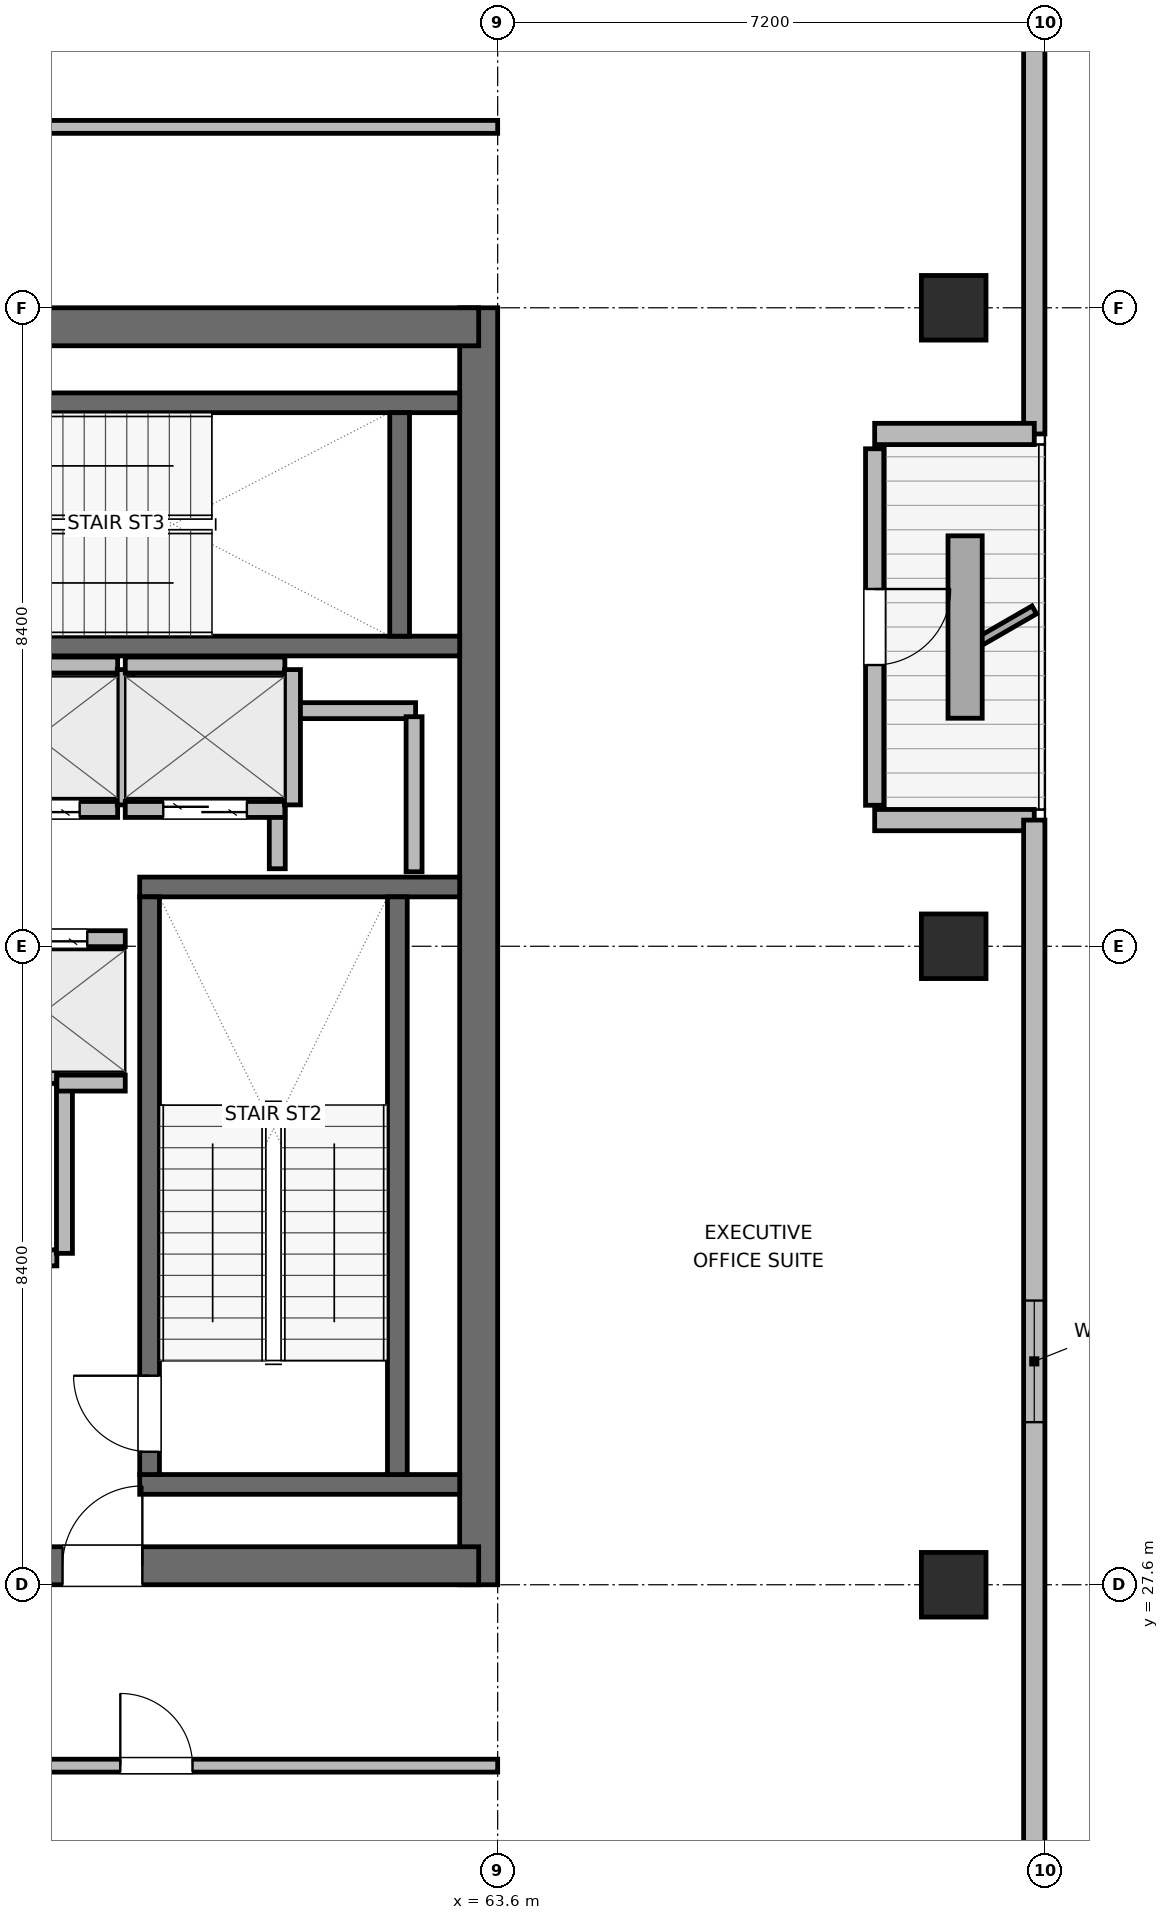
"""IFC4 building model, lengths in metres.
Left out: names, types, materials, properties, quantities, classifications, styles, units other than length and angle.
Written with IfcOpenShell. Run it as: python <this file> out.ifc"""

import sys

from ifc_helpers import new_model, si_unit, direction, frame, frame_2d, origin, origin_2d, place, context, subcontext, project, spatial, rectangle, extrude, element, fill, save


model = new_model("IFC4")
c1 = context("Model", 3, precision=1e-05, world=origin(), true_north=direction((0.0, 1.0)))
c2 = subcontext(c1, "Body", "Model", "MODEL_VIEW")
j1 = project(units=[si_unit("LENGTHUNIT", "METRE"), si_unit("PLANEANGLEUNIT", "RADIAN")], contexts=[c1])
p1 = place(None, origin())
s1 = spatial("IfcSite", under=j1, at=p1, CompositionType="ELEMENT")
p2 = place(p1, origin())
s2 = spatial("IfcBuilding", under=s1, at=p2, CompositionType="ELEMENT")
p3 = place(p2, frame((0.0, 0.0, 337.5)))
s3 = spatial("IfcBuildingStorey", under=s2, at=p3, CompositionType="ELEMENT", Elevation=337.5)
p4 = place(p3, frame((63.35, 27.6, 0.0), z_axis=(0.0, 0.0, 1.0), x_axis=(0.0, 1.0, 0.0)))
e1 = element("IfcWall", 1, at=p4, inside=s3, PredefinedType="SHEAR", context=c2, shape_type="SweptSolid", body=[
    extrude(rectangle(XDim=16.8, YDim=0.5, at=frame_2d((8.4, 0.0))), origin(), (0.0, 0.0, 1.0), 4.5),
])
p5 = place(p3, frame((53.85, 27.85, 0.0), z_axis=(0.0, 0.0, 1.0), x_axis=(1.0, 0.0, 0.0)))
e2 = element("IfcWall", 2, at=p5, inside=s3, PredefinedType="SHEAR", context=c2, shape_type="SweptSolid", body=[
    extrude(rectangle(XDim=9.5, YDim=0.5, at=frame_2d((4.75, 0.0))), origin(), (0.0, 0.0, 1.0), 4.5),
])
p6 = place(p5, frame((4.025, 0.0, 0.0)))
e3 = element("IfcOpeningElement", 3, at=p6, cuts=e2, PredefinedType="OPENING", context=c2, shape_type="SweptSolid", body=[
    extrude(rectangle(XDim=1.05, YDim=2.04, at=frame_2d((0.525, 1.02))), frame((0.0, 0.26, 0.0), z_axis=(0.0, -1.0, 0.0), x_axis=(1.0, 0.0, 0.0)), (0.0, 0.0, 1.0), 0.52),
])
p7 = place(p3, frame((53.85, 44.15, 0.0), z_axis=(0.0, 0.0, 1.0), x_axis=(1.0, 0.0, 0.0)))
e4 = element("IfcWall", 4, at=p7, inside=s3, PredefinedType="SHEAR", context=c2, shape_type="SweptSolid", body=[
    extrude(rectangle(XDim=9.5, YDim=0.5, at=frame_2d((4.75, 0.0))), origin(), (0.0, 0.0, 1.0), 4.5),
])
for number, where, z_axis, x_axis in (
    (5, (58.89, 28.92, 0.0), (0.0, 0.0, 1.0), (1.0, 0.0, 0.0)),
    (6, (58.89, 36.78, 0.0), (0.0, 0.0, 1.0), (1.0, 0.0, 0.0)),
):
    element("IfcWall", number, at=place(p3, frame(where, z_axis=z_axis, x_axis=x_axis)), inside=s3, PredefinedType="SHEAR", context=c2, shape_type="SweptSolid", body=[
        extrude(rectangle(XDim=4.21, YDim=0.26, at=frame_2d((2.105, 0.0))), origin(), (0.0, 0.0, 1.0), 4.5),
    ])
p8 = place(p3, frame((59.02, 29.05, 0.0), z_axis=(0.0, 0.0, 1.0), x_axis=(0.0, 1.0, 0.0)))
e7 = element("IfcWall", 7, at=p8, inside=s3, PredefinedType="SHEAR", context=c2, shape_type="SweptSolid", body=[
    extrude(rectangle(XDim=7.6, YDim=0.26, at=frame_2d((3.8, 0.0))), origin(), (0.0, 0.0, 1.0), 4.5),
])
p9 = place(p8, frame((0.3, 0.0, 0.0)))
e8 = element("IfcOpeningElement", 8, at=p9, cuts=e7, PredefinedType="OPENING", context=c2, shape_type="SweptSolid", body=[
    extrude(rectangle(XDim=1.0, YDim=2.04, at=frame_2d((0.5, 1.02))), frame((0.0, 0.14, 0.0), z_axis=(0.0, -1.0, 0.0), x_axis=(1.0, 0.0, 0.0)), (0.0, 0.0, 1.0), 0.28),
])
p10 = place(p3, frame((62.28, 29.05, 0.0), z_axis=(0.0, 0.0, 1.0), x_axis=(0.0, 1.0, 0.0)))
e9 = element("IfcWall", 9, at=p10, inside=s3, PredefinedType="SHEAR", context=c2, shape_type="SweptSolid", body=[
    extrude(rectangle(XDim=7.6, YDim=0.26, at=frame_2d((3.8, 0.0))), origin(), (0.0, 0.0, 1.0), 4.5),
])
p11 = place(p3, frame((54.1, 39.95, 0.0), z_axis=(0.0, 0.0, 1.0), x_axis=(1.0, 0.0, 0.0)))
e10 = element("IfcWall", 10, at=p11, inside=s3, PredefinedType="SHEAR", context=c2, shape_type="SweptSolid", body=[
    extrude(rectangle(XDim=9.0, YDim=0.26, at=frame_2d((4.5, 0.0))), origin(), (0.0, 0.0, 1.0), 4.5),
])
p12 = place(p11, frame((1.1, 0.0, 0.0)))
e11 = element("IfcOpeningElement", 11, at=p12, cuts=e10, PredefinedType="OPENING", context=c2, shape_type="SweptSolid", body=[
    extrude(rectangle(XDim=1.0, YDim=2.04, at=frame_2d((0.5, 1.02))), frame((0.0, 0.14, 0.0), z_axis=(0.0, -1.0, 0.0), x_axis=(1.0, 0.0, 0.0)), (0.0, 0.0, 1.0), 0.28),
])
p13 = place(p3, frame((54.1, 43.15, 0.0), z_axis=(0.0, 0.0, 1.0), x_axis=(1.0, 0.0, 0.0)))
e12 = element("IfcWall", 12, at=p13, inside=s3, PredefinedType="SHEAR", context=c2, shape_type="SweptSolid", body=[
    extrude(rectangle(XDim=9.0, YDim=0.26, at=frame_2d((4.5, 0.0))), origin(), (0.0, 0.0, 1.0), 4.5),
])
p14 = place(p3, frame((62.31, 40.08, 0.0), z_axis=(0.0, 0.0, 1.0), x_axis=(0.0, 1.0, 0.0)))
e13 = element("IfcWall", 13, at=p14, inside=s3, PredefinedType="SHEAR", context=c2, shape_type="SweptSolid", body=[
    extrude(rectangle(XDim=2.94, YDim=0.26, at=frame_2d((1.47, 0.0))), origin(), (0.0, 0.0, 1.0), 4.5),
])
for number, where, z_axis, x_axis in (
    (14, (69.6, 27.6, 0.0), (0.0, 0.0, 1.0), (1.0, 0.0, 0.0)),
    (15, (69.6, 36.0, 0.0), (0.0, 0.0, 1.0), (1.0, 0.0, 0.0)),
    (16, (69.6, 44.4, 0.0), (0.0, 0.0, 1.0), (1.0, 0.0, 0.0)),
):
    element("IfcColumn", number, at=place(p3, frame(where, z_axis=z_axis, x_axis=x_axis)), inside=s3, PredefinedType="COLUMN", context=c2, shape_type="SweptSolid", body=[
        extrude(rectangle(XDim=0.85, YDim=0.85, at=origin_2d()), origin(), (0.0, 0.0, 1.0), 4.5),
    ])
p15 = place(p3, frame((70.66, 48.582, 0.0), z_axis=(0.0, 0.0, 1.0), x_axis=(0.0, -1.0, 0.0)))
e17 = element("IfcWall", 17, at=p15, inside=s3, PredefinedType="SOLIDWALL", context=c2, shape_type="SweptSolid", body=[
    extrude(rectangle(XDim=5.842, YDim=0.28, at=frame_2d((2.921, 0.0))), origin(), (0.0, 0.0, 1.0), 4.28),
])
p16 = place(p3, frame((70.66, 42.74, 0.0), z_axis=(0.0, 0.0, 1.0), x_axis=(-1.0, 0.0, 0.0)))
e18 = element("IfcWall", 18, at=p16, inside=s3, PredefinedType="SOLIDWALL", context=c2, shape_type="SweptSolid", body=[
    extrude(rectangle(XDim=2.1, YDim=0.28, at=frame_2d((1.05, 0.0))), origin(), (0.0, 0.0, 1.0), 3.726),
])
p17 = place(p3, frame((68.56, 42.545, 0.0), z_axis=(0.0, 0.0, 1.0), x_axis=(0.0, -1.0, 0.0)))
e19 = element("IfcWall", 19, at=p17, inside=s3, PredefinedType="SOLIDWALL", context=c2, shape_type="SweptSolid", body=[
    extrude(rectangle(XDim=4.69, YDim=0.24, at=frame_2d((2.345, 0.0))), origin(), (0.0, 0.0, 1.0), 3.911),
])
p18 = place(p17, frame((1.845, 0.0, 0.0)))
e20 = element("IfcOpeningElement", 20, at=p18, cuts=e19, PredefinedType="OPENING", context=c2, shape_type="SweptSolid", body=[
    extrude(rectangle(XDim=1.0, YDim=2.02, at=frame_2d((0.5, 1.01))), frame((0.0, 0.13, 0.0), z_axis=(0.0, -1.0, 0.0), x_axis=(1.0, 0.0, 0.0)), (0.0, 0.0, 1.0), 0.26),
])
p19 = place(p3, frame((68.56, 37.66, 0.0), z_axis=(0.0, 0.0, 1.0), x_axis=(1.0, 0.0, 0.0)))
e21 = element("IfcWall", 21, at=p19, inside=s3, PredefinedType="SOLIDWALL", context=c2, shape_type="SweptSolid", body=[
    extrude(rectangle(XDim=2.1, YDim=0.28, at=frame_2d((1.05, 0.0))), origin(), (0.0, 0.0, 1.0), 3.726),
])
p20 = place(p3, frame((70.66, 37.66, 0.0), z_axis=(0.0, 0.0, 1.0), x_axis=(0.0, -1.0, 0.0)))
e22 = element("IfcWall", 22, at=p20, inside=s3, PredefinedType="SOLIDWALL", context=c2, shape_type="SweptSolid", body=[
    extrude(rectangle(XDim=14.241, YDim=0.28, at=frame_2d((7.121, 0.0))), origin(), (0.0, 0.0, 1.0), 4.28),
])
p21 = place(p20, frame((6.321, 0.0, 0.85)))
e23 = element("IfcOpeningElement", 23, at=p21, cuts=e22, PredefinedType="OPENING", context=c2, shape_type="SweptSolid", body=[
    extrude(rectangle(XDim=1.6, YDim=1.0, at=frame_2d((0.8, 0.5))), frame((0.0, 0.15, 0.0), z_axis=(0.0, -1.0, 0.0), x_axis=(1.0, 0.0, 0.0)), (0.0, 0.0, 1.0), 0.3),
])
p22 = place(p3, frame((60.72, 39.1, 0.0), z_axis=(0.0, 0.0, 1.0), x_axis=(1.0, 0.0, 0.0)))
e24 = element("IfcWall", 24, at=p22, inside=s3, PredefinedType="PARTITIONING", context=c2, shape_type="SweptSolid", body=[
    extrude(rectangle(XDim=1.8, YDim=0.21, at=frame_2d((0.9, 0.0))), origin(), (0.0, 0.0, 1.0), 4.28),
])
p23 = place(p3, frame((60.7, 37.02, 0.0), z_axis=(0.0, 0.0, 1.0), x_axis=(0.0, 1.0, 0.0)))
e25 = element("IfcWall", 25, at=p23, inside=s3, PredefinedType="PARTITIONING", context=c2, shape_type="SweptSolid", body=[
    extrude(rectangle(XDim=1.96, YDim=0.21, at=frame_2d((0.98, 0.0))), origin(), (0.0, 0.0, 1.0), 4.28),
])
p24 = place(p3, frame((62.5, 36.98, 0.0), z_axis=(0.0, 0.0, 1.0), x_axis=(0.0, 1.0, 0.0)))
e26 = element("IfcWall", 26, at=p24, inside=s3, PredefinedType="PARTITIONING", context=c2, shape_type="SweptSolid", body=[
    extrude(rectangle(XDim=2.04, YDim=0.21, at=frame_2d((1.02, 0.0))), origin(), (0.0, 0.0, 1.0), 4.28),
])
p25 = place(p3, frame((55.0, 31.9, 0.0), z_axis=(0.0, 0.0, 1.0), x_axis=(1.0, 0.0, 0.0)))
e27 = element("IfcWall", 27, at=p25, inside=s3, PredefinedType="PARTITIONING", context=c2, shape_type="SweptSolid", body=[
    extrude(rectangle(XDim=2.8, YDim=0.21, at=frame_2d((1.4, 0.0))), origin(), (0.0, 0.0, 1.0), 4.28),
])
p26 = place(p25, frame((0.8, 0.0, 0.0)))
e28 = element("IfcOpeningElement", 28, at=p26, cuts=e27, PredefinedType="OPENING", context=c2, shape_type="SweptSolid", body=[
    extrude(rectangle(XDim=1.2, YDim=2.04, at=frame_2d((0.6, 1.02))), frame((0.0, 0.115, 0.0), z_axis=(0.0, -1.0, 0.0), x_axis=(1.0, 0.0, 0.0)), (0.0, 0.0, 1.0), 0.23),
])
p27 = place(p3, frame((54.32, 34.3, 0.0), z_axis=(0.0, 0.0, 1.0), x_axis=(1.0, 0.0, 0.0)))
e29 = element("IfcWall", 29, at=p27, inside=s3, PredefinedType="PARTITIONING", context=c2, shape_type="SweptSolid", body=[
    extrude(rectangle(XDim=3.48, YDim=0.21, at=frame_2d((1.74, 0.0))), origin(), (0.0, 0.0, 1.0), 4.28),
])
p28 = place(p3, frame((57.9, 31.96, 0.0), z_axis=(0.0, 0.0, 1.0), x_axis=(0.0, 1.0, 0.0)))
e30 = element("IfcWall", 30, at=p28, inside=s3, PredefinedType="PARTITIONING", context=c2, shape_type="SweptSolid", body=[
    extrude(rectangle(XDim=2.28, YDim=0.21, at=frame_2d((1.14, 0.0))), origin(), (0.0, 0.0, 1.0), 4.28),
])
p29 = place(p3, frame((56.6, 36.1, 0.0), z_axis=(0.0, 0.0, 1.0), x_axis=(1.0, 0.0, 0.0)))
e31 = element("IfcWall", 31, at=p29, inside=s3, PredefinedType="PARTITIONING", context=c2, shape_type="SweptSolid", body=[
    extrude(rectangle(XDim=2.1, YDim=0.21, at=frame_2d((1.05, 0.0))), origin(), (0.0, 0.0, 1.0), 4.28),
])
p30 = place(p29, frame((0.5, 0.0, 0.0)))
e32 = element("IfcOpeningElement", 32, at=p30, cuts=e31, PredefinedType="OPENING", context=c2, shape_type="SweptSolid", body=[
    extrude(rectangle(XDim=1.1, YDim=2.04, at=frame_2d((0.55, 1.02))), frame((0.0, 0.115, 0.0), z_axis=(0.0, -1.0, 0.0), x_axis=(1.0, 0.0, 0.0)), (0.0, 0.0, 1.0), 0.23),
])
p31 = place(p3, frame((57.8, 34.2, 0.0), z_axis=(0.0, 0.0, 1.0), x_axis=(1.0, 0.0, 0.0)))
e33 = element("IfcWall", 33, at=p31, inside=s3, PredefinedType="PARTITIONING", context=c2, shape_type="SweptSolid", body=[
    extrude(rectangle(XDim=0.9, YDim=0.21, at=frame_2d((0.45, 0.0))), origin(), (0.0, 0.0, 1.0), 4.28),
])
p32 = place(p3, frame((56.5, 37.8, 0.0), z_axis=(0.0, 0.0, 1.0), x_axis=(1.0, 0.0, 0.0)))
e34 = element("IfcWall", 34, at=p32, inside=s3, PredefinedType="PARTITIONING", context=c2, shape_type="SweptSolid", body=[
    extrude(rectangle(XDim=2.1, YDim=0.21, at=frame_2d((1.05, 0.0))), origin(), (0.0, 0.0, 1.0), 4.28),
])
p33 = place(p32, frame((0.5, 0.0, 0.0)))
e35 = element("IfcOpeningElement", 35, at=p33, cuts=e34, PredefinedType="OPENING", context=c2, shape_type="SweptSolid", body=[
    extrude(rectangle(XDim=1.1, YDim=2.04, at=frame_2d((0.55, 1.02))), frame((0.0, 0.115, 0.0), z_axis=(0.0, -1.0, 0.0), x_axis=(1.0, 0.0, 0.0)), (0.0, 0.0, 1.0), 0.23),
])
p34 = place(p3, frame((56.5, 39.7, 0.0), z_axis=(0.0, 0.0, 1.0), x_axis=(1.0, 0.0, 0.0)))
e36 = element("IfcWall", 36, at=p34, inside=s3, PredefinedType="PARTITIONING", context=c2, shape_type="SweptSolid", body=[
    extrude(rectangle(XDim=2.1, YDim=0.21, at=frame_2d((1.05, 0.0))), origin(), (0.0, 0.0, 1.0), 4.28),
])
p35 = place(p3, frame((58.7, 37.86, 0.0), z_axis=(0.0, 0.0, 1.0), x_axis=(0.0, 1.0, 0.0)))
e37 = element("IfcWall", 37, at=p35, inside=s3, PredefinedType="PARTITIONING", context=c2, shape_type="SweptSolid", body=[
    extrude(rectangle(XDim=1.78, YDim=0.21, at=frame_2d((0.89, 0.0))), origin(), (0.0, 0.0, 1.0), 4.28),
])
p36 = place(p3, frame((58.7, 37.8, 0.0), z_axis=(0.0, 0.0, 1.0), x_axis=(1.0, 0.0, 0.0)))
e38 = element("IfcWall", 38, at=p36, inside=s3, PredefinedType="PARTITIONING", context=c2, shape_type="SweptSolid", body=[
    extrude(rectangle(XDim=2.1, YDim=0.21, at=frame_2d((1.05, 0.0))), origin(), (0.0, 0.0, 1.0), 4.28),
])
p37 = place(p36, frame((0.5, 0.0, 0.0)))
e39 = element("IfcOpeningElement", 39, at=p37, cuts=e38, PredefinedType="OPENING", context=c2, shape_type="SweptSolid", body=[
    extrude(rectangle(XDim=1.1, YDim=2.04, at=frame_2d((0.55, 1.02))), frame((0.0, 0.115, 0.0), z_axis=(0.0, -1.0, 0.0), x_axis=(1.0, 0.0, 0.0)), (0.0, 0.0, 1.0), 0.23),
])
p38 = place(p3, frame((58.7, 39.7, 0.0), z_axis=(0.0, 0.0, 1.0), x_axis=(1.0, 0.0, 0.0)))
e40 = element("IfcWall", 40, at=p38, inside=s3, PredefinedType="PARTITIONING", context=c2, shape_type="SweptSolid", body=[
    extrude(rectangle(XDim=2.1, YDim=0.21, at=frame_2d((1.05, 0.0))), origin(), (0.0, 0.0, 1.0), 4.28),
])
p39 = place(p3, frame((60.9, 37.86, 0.0), z_axis=(0.0, 0.0, 1.0), x_axis=(0.0, 1.0, 0.0)))
e41 = element("IfcWall", 41, at=p39, inside=s3, PredefinedType="PARTITIONING", context=c2, shape_type="SweptSolid", body=[
    extrude(rectangle(XDim=1.78, YDim=0.21, at=frame_2d((0.89, 0.0))), origin(), (0.0, 0.0, 1.0), 4.28),
])
p40 = place(p3, frame((30.075, 25.22, 0.0), z_axis=(0.0, 0.0, 1.0), x_axis=(1.0, 0.0, 0.0)))
e42 = element("IfcWall", 42, at=p40, inside=s3, PredefinedType="PARTITIONING", context=c2, shape_type="SweptSolid", body=[
    extrude(rectangle(XDim=33.525, YDim=0.17, at=frame_2d((16.763, 0.0))), origin(), (0.0, 0.0, 1.0), 4.28),
])
p41 = place(p40, frame((4.018, 0.0, 0.0)))
e43 = element("IfcOpeningElement", 43, at=p41, cuts=e42, PredefinedType="OPENING", context=c2, shape_type="SweptSolid", body=[
    extrude(rectangle(XDim=0.95, YDim=2.04, at=frame_2d((0.475, 1.02))), frame((0.0, 0.095, 0.0), z_axis=(0.0, -1.0, 0.0), x_axis=(1.0, 0.0, 0.0)), (0.0, 0.0, 1.0), 0.19),
])
p42 = place(p40, frame((12.4, 0.0, 0.0)))
e44 = element("IfcOpeningElement", 44, at=p42, cuts=e42, PredefinedType="OPENING", context=c2, shape_type="SweptSolid", body=[
    extrude(rectangle(XDim=0.95, YDim=2.04, at=frame_2d((0.475, 1.02))), frame((0.0, 0.095, 0.0), z_axis=(0.0, -1.0, 0.0), x_axis=(1.0, 0.0, 0.0)), (0.0, 0.0, 1.0), 0.19),
])
p43 = place(p40, frame((20.18, 0.0, 0.0)))
e45 = element("IfcOpeningElement", 45, at=p43, cuts=e42, PredefinedType="OPENING", context=c2, shape_type="SweptSolid", body=[
    extrude(rectangle(XDim=0.95, YDim=2.04, at=frame_2d((0.475, 1.02))), frame((0.0, 0.095, 0.0), z_axis=(0.0, -1.0, 0.0), x_axis=(1.0, 0.0, 0.0)), (0.0, 0.0, 1.0), 0.19),
])
p44 = place(p40, frame((28.56, 0.0, 0.0)))
e46 = element("IfcOpeningElement", 46, at=p44, cuts=e42, PredefinedType="OPENING", context=c2, shape_type="SweptSolid", body=[
    extrude(rectangle(XDim=0.95, YDim=2.04, at=frame_2d((0.475, 1.02))), frame((0.0, 0.095, 0.0), z_axis=(0.0, -1.0, 0.0), x_axis=(1.0, 0.0, 0.0)), (0.0, 0.0, 1.0), 0.19),
])
p45 = place(p3, frame((30.075, 46.78, 0.0), z_axis=(0.0, 0.0, 1.0), x_axis=(1.0, 0.0, 0.0)))
e47 = element("IfcWall", 47, at=p45, inside=s3, PredefinedType="PARTITIONING", context=c2, shape_type="SweptSolid", body=[
    extrude(rectangle(XDim=33.525, YDim=0.17, at=frame_2d((16.763, 0.0))), origin(), (0.0, 0.0, 1.0), 4.28),
])
p46 = place(p45, frame((3.852, 0.0, 0.0)))
e48 = element("IfcOpeningElement", 48, at=p46, cuts=e47, PredefinedType="OPENING", context=c2, shape_type="SweptSolid", body=[
    extrude(rectangle(XDim=0.95, YDim=2.04, at=frame_2d((0.475, 1.02))), frame((0.0, 0.095, 0.0), z_axis=(0.0, -1.0, 0.0), x_axis=(1.0, 0.0, 0.0)), (0.0, 0.0, 1.0), 0.19),
])
p47 = place(p45, frame((20.615, 0.0, 0.0)))
e49 = element("IfcOpeningElement", 49, at=p47, cuts=e47, PredefinedType="OPENING", context=c2, shape_type="SweptSolid", body=[
    extrude(rectangle(XDim=0.95, YDim=2.04, at=frame_2d((0.475, 1.02))), frame((0.0, 0.095, 0.0), z_axis=(0.0, -1.0, 0.0), x_axis=(1.0, 0.0, 0.0)), (0.0, 0.0, 1.0), 0.19),
])
p48 = place(p18, origin())
e50 = element("IfcDoor", 50, at=p48, inside=s3, OperationType="SINGLE_SWING_LEFT", PredefinedType="DOOR", context=c2, shape_type="SweptSolid", body=[
    extrude(rectangle(XDim=1.0, YDim=2.02, at=frame_2d((0.5, 1.01))), frame((0.0, 0.025, 0.0), z_axis=(0.0, -1.0, 0.0), x_axis=(1.0, 0.0, 0.0)), (0.0, 0.0, 1.0), 0.05),
])
fill(e20, e50)
p49 = place(p21, origin())
e51 = element("IfcWindow", 51, at=p49, inside=s3, PartitioningType="SINGLE_PANEL", PredefinedType="WINDOW", context=c2, shape_type="SweptSolid", body=[
    extrude(rectangle(XDim=1.6, YDim=1.0, at=frame_2d((0.8, 0.5))), frame((0.0, 0.03, 0.0), z_axis=(0.0, -1.0, 0.0), x_axis=(1.0, 0.0, 0.0)), (0.0, 0.0, 1.0), 0.06),
])
fill(e23, e51)
p50 = place(p9, origin())
e52 = element("IfcDoor", 52, at=p50, inside=s3, OperationType="SINGLE_SWING_RIGHT", PredefinedType="DOOR", context=c2, shape_type="SweptSolid", body=[
    extrude(rectangle(XDim=1.0, YDim=2.04, at=frame_2d((0.5, 1.02))), frame((0.0, 0.025, 0.0), z_axis=(0.0, -1.0, 0.0), x_axis=(1.0, 0.0, 0.0)), (0.0, 0.0, 1.0), 0.05),
])
fill(e8, e52)
p51 = place(p30, origin())
e53 = element("IfcDoor", 53, at=p51, inside=s3, OperationType="DOUBLE_DOOR_SLIDING", PredefinedType="DOOR", context=c2, shape_type="SweptSolid", body=[
    extrude(rectangle(XDim=1.1, YDim=2.04, at=frame_2d((0.55, 1.02))), frame((0.0, 0.025, 0.0), z_axis=(0.0, -1.0, 0.0), x_axis=(1.0, 0.0, 0.0)), (0.0, 0.0, 1.0), 0.05),
])
fill(e32, e53)
p52 = place(p33, origin())
e54 = element("IfcDoor", 54, at=p52, inside=s3, OperationType="DOUBLE_DOOR_SLIDING", PredefinedType="DOOR", context=c2, shape_type="SweptSolid", body=[
    extrude(rectangle(XDim=1.1, YDim=2.04, at=frame_2d((0.55, 1.02))), frame((0.0, 0.025, 0.0), z_axis=(0.0, -1.0, 0.0), x_axis=(1.0, 0.0, 0.0)), (0.0, 0.0, 1.0), 0.05),
])
fill(e35, e54)
p53 = place(p37, origin())
e55 = element("IfcDoor", 55, at=p53, inside=s3, OperationType="DOUBLE_DOOR_SLIDING", PredefinedType="DOOR", context=c2, shape_type="SweptSolid", body=[
    extrude(rectangle(XDim=1.1, YDim=2.04, at=frame_2d((0.55, 1.02))), frame((0.0, 0.025, 0.0), z_axis=(0.0, -1.0, 0.0), x_axis=(1.0, 0.0, 0.0)), (0.0, 0.0, 1.0), 0.05),
])
fill(e39, e55)
p54 = place(p6, origin())
e56 = element("IfcDoor", 56, at=p54, inside=s3, OperationType="SINGLE_SWING_RIGHT", PredefinedType="DOOR", context=c2, shape_type="SweptSolid", body=[
    extrude(rectangle(XDim=1.05, YDim=2.04, at=frame_2d((0.525, 1.02))), frame((0.0, 0.025, 0.0), z_axis=(0.0, -1.0, 0.0), x_axis=(1.0, 0.0, 0.0)), (0.0, 0.0, 1.0), 0.05),
])
fill(e3, e56)
p55 = place(p44, origin())
e57 = element("IfcDoor", 57, at=p55, inside=s3, OperationType="SINGLE_SWING_LEFT", PredefinedType="DOOR", context=c2, shape_type="SweptSolid", body=[
    extrude(rectangle(XDim=0.95, YDim=2.04, at=frame_2d((0.475, 1.02))), frame((0.0, 0.025, 0.0), z_axis=(0.0, -1.0, 0.0), x_axis=(1.0, 0.0, 0.0)), (0.0, 0.0, 1.0), 0.05),
])
fill(e46, e57)
save(model, sys.argv[1])
